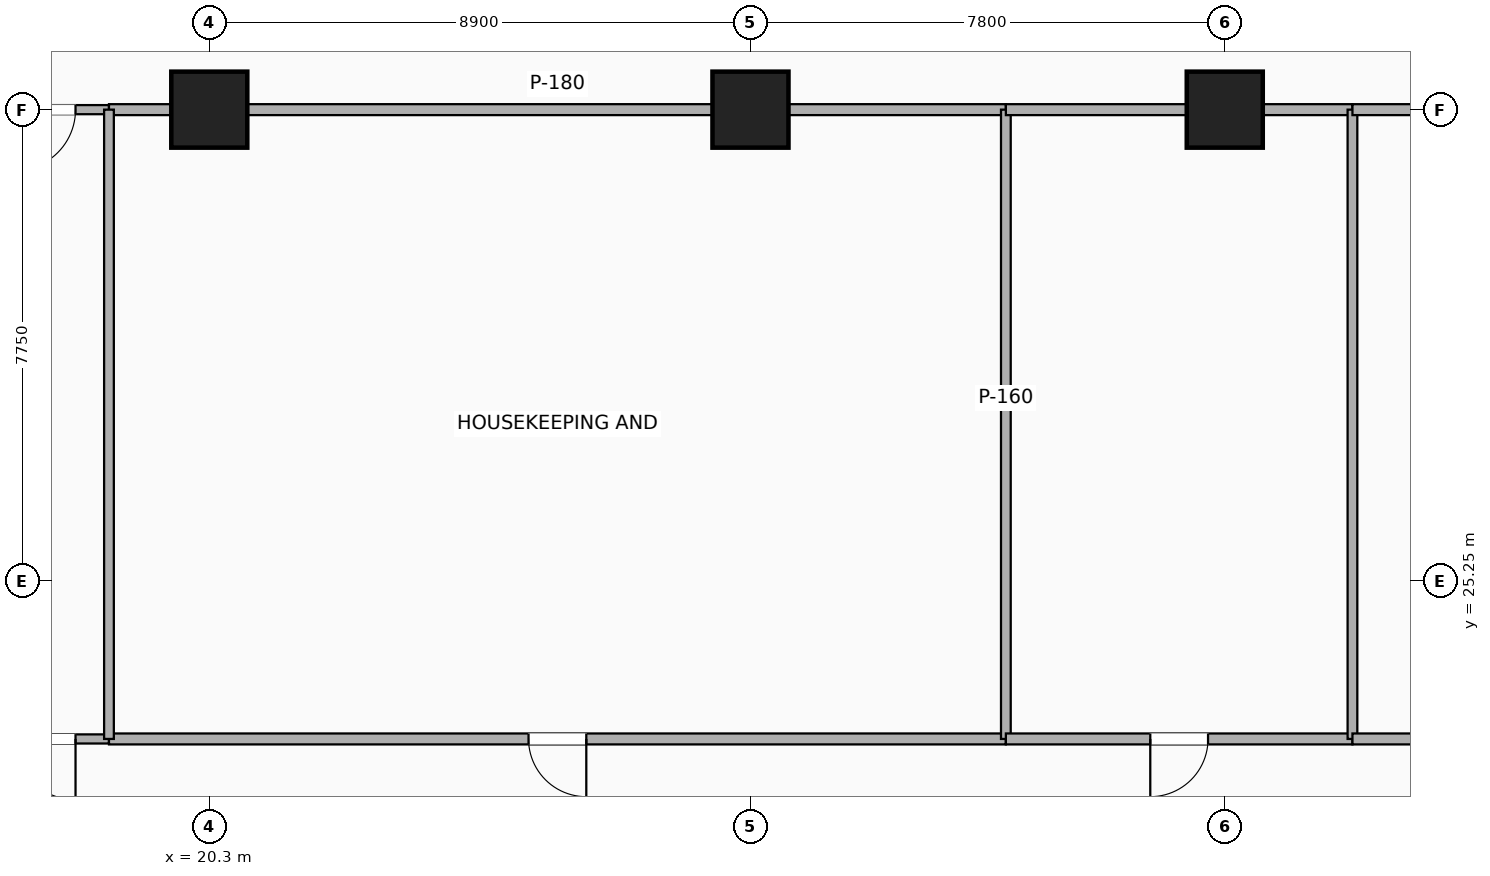
"""IFC4 building model, lengths in metres.
Left out: names, types, materials, properties, quantities, classifications, styles, units other than length and angle.
Written with IfcOpenShell. Run it as: python <this file> out.ifc"""

import sys

from ifc_helpers import new_model, si_unit, direction, frame, frame_2d, origin, origin_2d, place, context, subcontext, project, spatial, rectangle, extrude, element, fill, save


model = new_model("IFC4")
c1 = context("Model", 3, precision=1e-05, world=origin(), true_north=direction((0.0, 1.0)))
c2 = subcontext(c1, "Body", "Model", "MODEL_VIEW")
j1 = project(units=[si_unit("LENGTHUNIT", "METRE"), si_unit("PLANEANGLEUNIT", "RADIAN")], contexts=[c1])
p1 = place(None, origin())
s1 = spatial("IfcSite", under=j1, at=p1, CompositionType="ELEMENT")
p2 = place(p1, origin())
s2 = spatial("IfcBuilding", under=s1, at=p2, CompositionType="ELEMENT")
p3 = place(p2, frame((0.0, 0.0, 95.2)))
s3 = spatial("IfcBuildingStorey", under=s2, at=p3, CompositionType="ELEMENT", Elevation=95.2)
for number, where, z_axis, x_axis in (
    (1, (20.3, 33.0, -0.26), (0.0, 0.0, 1.0), (1.0, 0.0, 0.0)),
    (2, (29.2, 33.0, -0.26), (0.0, 0.0, 1.0), (1.0, 0.0, 0.0)),
    (3, (37.0, 33.0, -0.26), (0.0, 0.0, 1.0), (1.0, 0.0, 0.0)),
):
    element("IfcColumn", number, at=place(p3, frame(where, z_axis=z_axis, x_axis=x_axis)), inside=s3, PredefinedType="COLUMN", context=c2, shape_type="SweptSolid", body=[
        extrude(rectangle(XDim=1.25, YDim=1.25, at=origin_2d()), origin(), (0.0, 0.0, 1.0), 3.5),
    ])
p4 = place(p3, frame((16.65, 22.65, 0.0), z_axis=(0.0, 0.0, 1.0), x_axis=(1.0, 0.0, 0.0)))
e4 = element("IfcWall", 4, at=p4, inside=s3, PredefinedType="PARTITIONING", context=c2, shape_type="SweptSolid", body=[
    extrude(rectangle(XDim=2.0, YDim=0.15, at=frame_2d((1.0, 0.0))), origin(), (0.0, 0.0, 1.0), 3.24),
])
p5 = place(p4, frame((0.45, 0.0, 0.0)))
e5 = element("IfcOpeningElement", 5, at=p5, cuts=e4, PredefinedType="OPENING", context=c2, shape_type="SweptSolid", body=[
    extrude(rectangle(XDim=1.0, YDim=2.15, at=frame_2d((0.5, 1.075))), frame((0.0, 0.085, 0.0), z_axis=(0.0, -1.0, 0.0), x_axis=(1.0, 0.0, 0.0)), (0.0, 0.0, 1.0), 0.17),
])
p6 = place(p3, frame((16.65, 33.0, 0.0), z_axis=(0.0, 0.0, 1.0), x_axis=(1.0, 0.0, 0.0)))
e6 = element("IfcWall", 6, at=p6, inside=s3, PredefinedType="PARTITIONING", context=c2, shape_type="SweptSolid", body=[
    extrude(rectangle(XDim=2.0, YDim=0.15, at=frame_2d((1.0, 0.0))), origin(), (0.0, 0.0, 1.0), 2.313),
])
p7 = place(p6, frame((0.45, 0.0, 0.0)))
e7 = element("IfcOpeningElement", 7, at=p7, cuts=e6, PredefinedType="OPENING", context=c2, shape_type="SweptSolid", body=[
    extrude(rectangle(XDim=1.0, YDim=2.15, at=frame_2d((0.5, 1.075))), frame((0.0, 0.085, 0.0), z_axis=(0.0, -1.0, 0.0), x_axis=(1.0, 0.0, 0.0)), (0.0, 0.0, 1.0), 0.17),
])
p8 = place(p3, frame((18.65, 22.65, 0.0), z_axis=(0.0, 0.0, 1.0), x_axis=(1.0, 0.0, 0.0)))
e8 = element("IfcWall", 8, at=p8, inside=s3, PredefinedType="PARTITIONING", context=c2, shape_type="SweptSolid", body=[
    extrude(rectangle(XDim=14.75, YDim=0.18, at=frame_2d((7.375, 0.0))), origin(), (0.0, 0.0, 1.0), 2.313),
])
p9 = place(p8, frame((6.9, 0.0, 0.0)))
e9 = element("IfcOpeningElement", 9, at=p9, cuts=e8, PredefinedType="OPENING", context=c2, shape_type="SweptSolid", body=[
    extrude(rectangle(XDim=0.95, YDim=2.15, at=frame_2d((0.475, 1.075))), frame((0.0, 0.1, 0.0), z_axis=(0.0, -1.0, 0.0), x_axis=(1.0, 0.0, 0.0)), (0.0, 0.0, 1.0), 0.2),
])
p10 = place(p3, frame((18.65, 33.0, 0.0), z_axis=(0.0, 0.0, 1.0), x_axis=(1.0, 0.0, 0.0)))
e10 = element("IfcWall", 10, at=p10, inside=s3, PredefinedType="PARTITIONING", context=c2, shape_type="SweptSolid", body=[
    extrude(rectangle(XDim=14.75, YDim=0.18, at=frame_2d((7.375, 0.0))), origin(), (0.0, 0.0, 1.0), 2.313),
])
p11 = place(p3, frame((18.65, 22.65, 0.0), z_axis=(0.0, 0.0, 1.0), x_axis=(0.0, 1.0, 0.0)))
e11 = element("IfcWall", 11, at=p11, inside=s3, PredefinedType="PARTITIONING", context=c2, shape_type="SweptSolid", body=[
    extrude(rectangle(XDim=10.35, YDim=0.16, at=frame_2d((5.175, 0.0))), origin(), (0.0, 0.0, 1.0), 2.313),
])
p12 = place(p3, frame((33.4, 22.65, 0.0), z_axis=(0.0, 0.0, 1.0), x_axis=(0.0, 1.0, 0.0)))
e12 = element("IfcWall", 12, at=p12, inside=s3, PredefinedType="PARTITIONING", context=c2, shape_type="SweptSolid", body=[
    extrude(rectangle(XDim=10.35, YDim=0.16, at=frame_2d((5.175, 0.0))), origin(), (0.0, 0.0, 1.0), 2.614),
])
p13 = place(p3, frame((33.4, 22.65, 0.0), z_axis=(0.0, 0.0, 1.0), x_axis=(1.0, 0.0, 0.0)))
e13 = element("IfcWall", 13, at=p13, inside=s3, PredefinedType="PARTITIONING", context=c2, shape_type="SweptSolid", body=[
    extrude(rectangle(XDim=5.7, YDim=0.18, at=frame_2d((2.85, 0.0))), origin(), (0.0, 0.0, 1.0), 2.313),
])
p14 = place(p13, frame((2.375, 0.0, 0.0)))
e14 = element("IfcOpeningElement", 14, at=p14, cuts=e13, PredefinedType="OPENING", context=c2, shape_type="SweptSolid", body=[
    extrude(rectangle(XDim=0.95, YDim=2.15, at=frame_2d((0.475, 1.075))), frame((0.0, 0.1, 0.0), z_axis=(0.0, -1.0, 0.0), x_axis=(1.0, 0.0, 0.0)), (0.0, 0.0, 1.0), 0.2),
])
p15 = place(p3, frame((33.4, 33.0, 0.0), z_axis=(0.0, 0.0, 1.0), x_axis=(1.0, 0.0, 0.0)))
e15 = element("IfcWall", 15, at=p15, inside=s3, PredefinedType="PARTITIONING", context=c2, shape_type="SweptSolid", body=[
    extrude(rectangle(XDim=5.7, YDim=0.18, at=frame_2d((2.85, 0.0))), origin(), (0.0, 0.0, 1.0), 2.313),
])
p16 = place(p3, frame((39.1, 22.65, 0.0), z_axis=(0.0, 0.0, 1.0), x_axis=(0.0, 1.0, 0.0)))
e16 = element("IfcWall", 16, at=p16, inside=s3, PredefinedType="PARTITIONING", context=c2, shape_type="SweptSolid", body=[
    extrude(rectangle(XDim=10.35, YDim=0.16, at=frame_2d((5.175, 0.0))), origin(), (0.0, 0.0, 1.0), 2.614),
])
p17 = place(p3, frame((39.1, 22.65, 0.0), z_axis=(0.0, 0.0, 1.0), x_axis=(1.0, 0.0, 0.0)))
e17 = element("IfcWall", 17, at=p17, inside=s3, PredefinedType="PARTITIONING", context=c2, shape_type="SweptSolid", body=[
    extrude(rectangle(XDim=7.35, YDim=0.18, at=frame_2d((3.675, 0.0))), origin(), (0.0, 0.0, 1.0), 2.313),
])
p18 = place(p17, frame((3.2, 0.0, 0.0)))
e18 = element("IfcOpeningElement", 18, at=p18, cuts=e17, PredefinedType="OPENING", context=c2, shape_type="SweptSolid", body=[
    extrude(rectangle(XDim=0.95, YDim=2.15, at=frame_2d((0.475, 1.075))), frame((0.0, 0.1, 0.0), z_axis=(0.0, -1.0, 0.0), x_axis=(1.0, 0.0, 0.0)), (0.0, 0.0, 1.0), 0.2),
])
p19 = place(p3, frame((39.1, 33.0, 0.0), z_axis=(0.0, 0.0, 1.0), x_axis=(1.0, 0.0, 0.0)))
e19 = element("IfcWall", 19, at=p19, inside=s3, PredefinedType="PARTITIONING", context=c2, shape_type="SweptSolid", body=[
    extrude(rectangle(XDim=7.35, YDim=0.18, at=frame_2d((3.675, 0.0))), origin(), (0.0, 0.0, 1.0), 2.313),
])
p20 = place(p5, origin())
e20 = element("IfcDoor", 20, at=p20, inside=s3, OperationType="SINGLE_SWING_RIGHT", PredefinedType="DOOR", context=c2, shape_type="SweptSolid", body=[
    extrude(rectangle(XDim=1.0, YDim=2.15, at=frame_2d((0.5, 1.075))), frame((0.0, 0.025, 0.0), z_axis=(0.0, -1.0, 0.0), x_axis=(1.0, 0.0, 0.0)), (0.0, 0.0, 1.0), 0.05),
])
fill(e5, e20)
p21 = place(p7, origin())
e21 = element("IfcDoor", 21, at=p21, inside=s3, OperationType="SINGLE_SWING_LEFT", PredefinedType="DOOR", context=c2, shape_type="SweptSolid", body=[
    extrude(rectangle(XDim=1.0, YDim=2.15, at=frame_2d((0.5, 1.075))), frame((0.0, 0.025, 0.0), z_axis=(0.0, -1.0, 0.0), x_axis=(1.0, 0.0, 0.0)), (0.0, 0.0, 1.0), 0.05),
])
fill(e7, e21)
p22 = place(p9, origin())
e22 = element("IfcDoor", 22, at=p22, inside=s3, OperationType="SINGLE_SWING_RIGHT", PredefinedType="DOOR", context=c2, shape_type="SweptSolid", body=[
    extrude(rectangle(XDim=0.95, YDim=2.15, at=frame_2d((0.475, 1.075))), frame((0.0, 0.025, 0.0), z_axis=(0.0, -1.0, 0.0), x_axis=(1.0, 0.0, 0.0)), (0.0, 0.0, 1.0), 0.05),
])
fill(e9, e22)
p23 = place(p14, origin())
e23 = element("IfcDoor", 23, at=p23, inside=s3, OperationType="SINGLE_SWING_LEFT", PredefinedType="DOOR", context=c2, shape_type="SweptSolid", body=[
    extrude(rectangle(XDim=0.95, YDim=2.15, at=frame_2d((0.475, 1.075))), frame((0.0, 0.025, 0.0), z_axis=(0.0, -1.0, 0.0), x_axis=(1.0, 0.0, 0.0)), (0.0, 0.0, 1.0), 0.05),
])
fill(e14, e23)
save(model, sys.argv[1])
